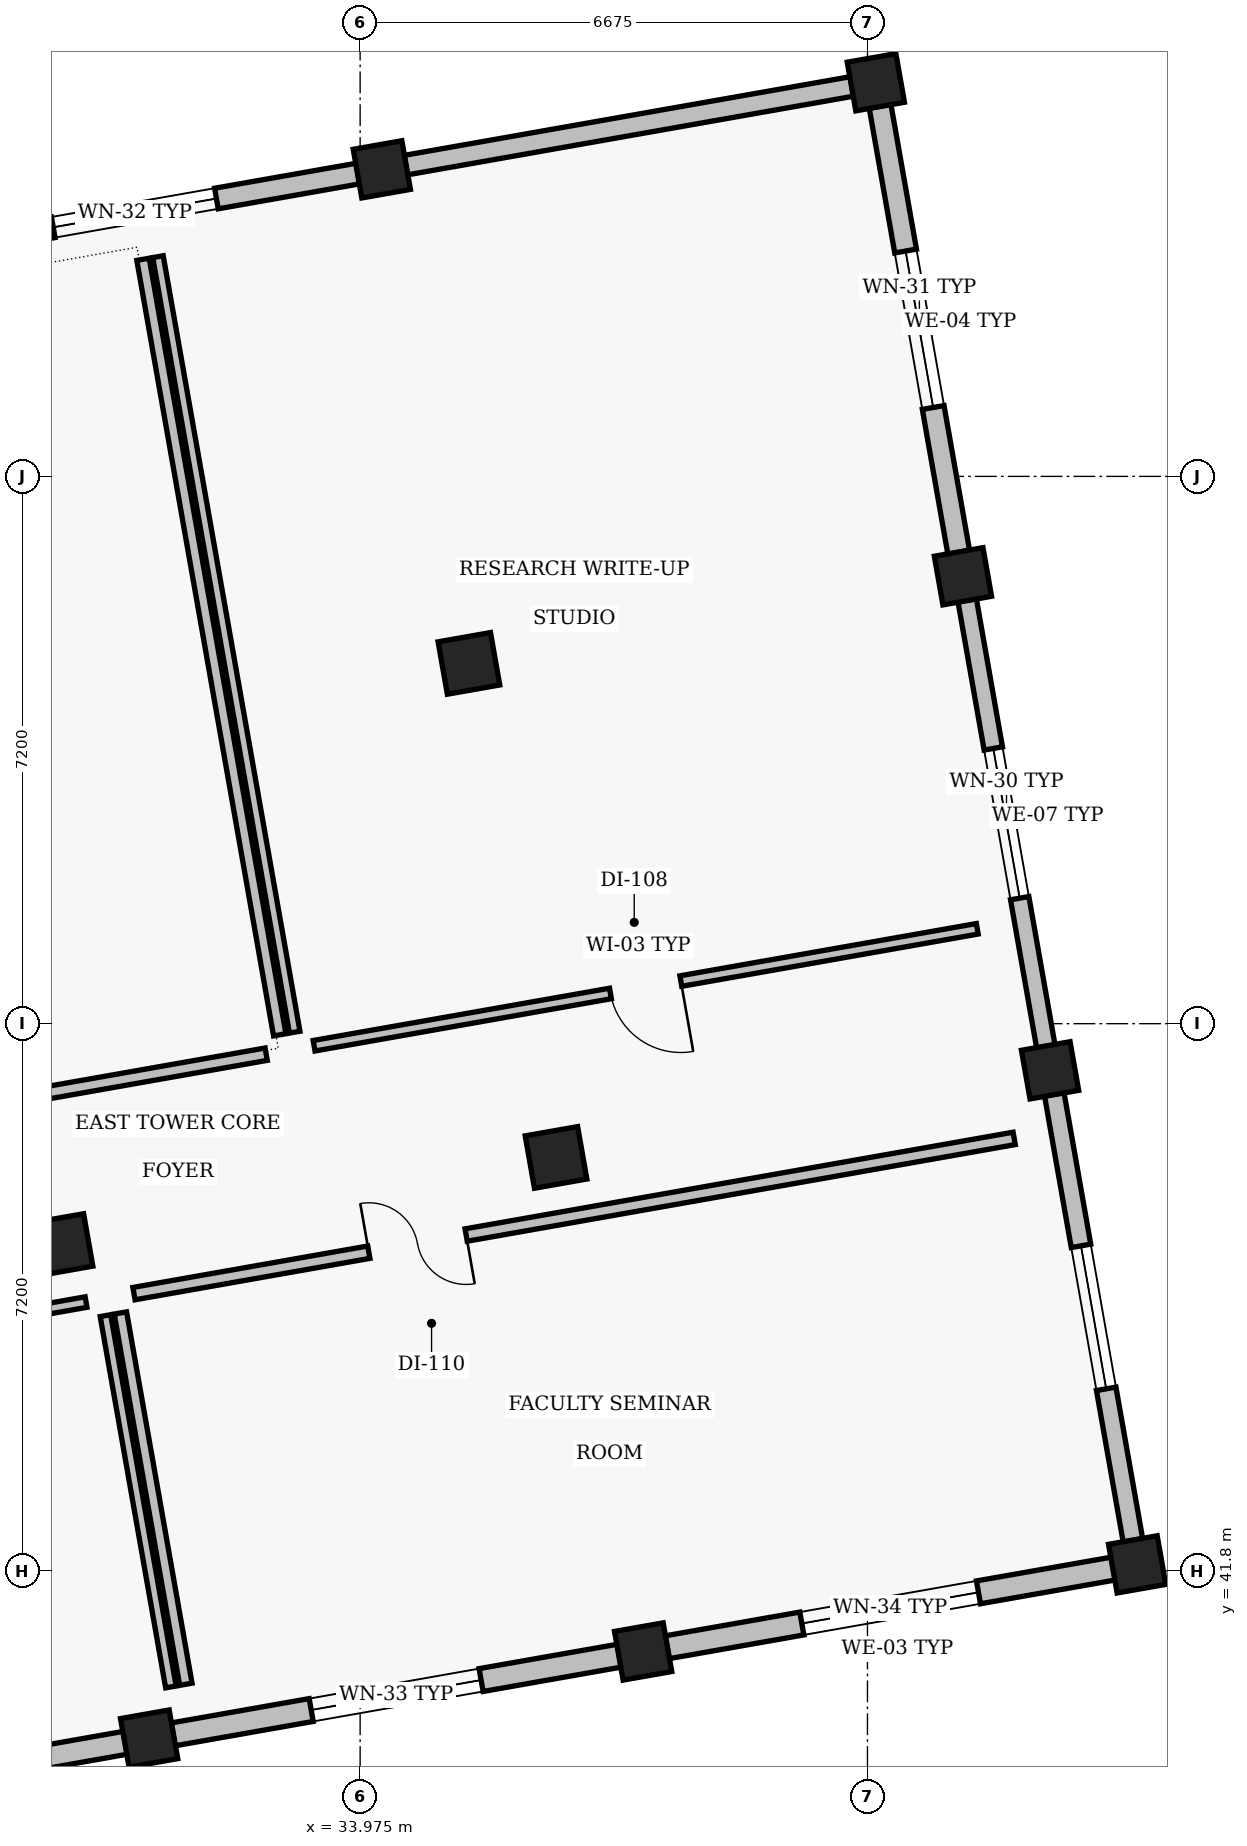
"""IFC4 building model, lengths in metres.
Left out: names, types, materials, properties, quantities, classifications, styles, units other than length and angle.
Written with IfcOpenShell. Run it as: python <this file> out.ifc"""

import sys

from ifc_helpers import new_model, si_unit, direction, frame, frame_2d, origin, origin_2d, place, context, subcontext, project, spatial, rectangle, extrude, element, fill, save


model = new_model("IFC4")
c1 = context("Model", 3, precision=1e-05, world=origin(), true_north=direction((0.0, 1.0)))
c2 = subcontext(c1, "Body", "Model", "MODEL_VIEW")
j1 = project(units=[si_unit("LENGTHUNIT", "METRE"), si_unit("PLANEANGLEUNIT", "RADIAN")], contexts=[c1])
p1 = place(None, origin())
s1 = spatial("IfcSite", under=j1, at=p1, CompositionType="ELEMENT")
p2 = place(p1, origin())
s2 = spatial("IfcBuilding", under=s1, at=p2, CompositionType="ELEMENT")
p3 = place(p2, frame((0.0, 0.0, 18.6)))
s3 = spatial("IfcBuildingStorey", under=s2, at=p3, CompositionType="ELEMENT", Elevation=18.6)
p4 = place(p3, frame((31.199, 39.594, 0.0), z_axis=(0.0, 0.0, 1.0), x_axis=(0.984807753012, 0.173648177667, 0.0)))
e1 = element("IfcColumn", 1, at=p4, inside=s3, PredefinedType="COLUMN", context=c2, shape_type="SweptSolid", body=[
    extrude(rectangle(XDim=0.65, YDim=0.65, at=origin_2d()), origin(), (0.0, 0.0, 1.0), 4.32),
])
p5 = place(p3, frame((30.053, 46.094, 0.0), z_axis=(0.0, 0.0, 1.0), x_axis=(0.984807753012, 0.173648177667, 0.0)))
e2 = element("IfcColumn", 2, at=p5, inside=s3, PredefinedType="COLUMN", context=c2, shape_type="SweptSolid", body=[
    extrude(rectangle(XDim=0.7, YDim=0.7, at=origin_2d()), origin(), (0.0, 0.0, 1.0), 4.32),
])
p6 = place(p3, frame((37.699, 40.74, 0.0), z_axis=(0.0, 0.0, 1.0), x_axis=(0.984807753012, 0.173648177667, 0.0)))
e3 = element("IfcColumn", 3, at=p6, inside=s3, PredefinedType="COLUMN", context=c2, shape_type="SweptSolid", body=[
    extrude(rectangle(XDim=0.65, YDim=0.65, at=origin_2d()), origin(), (0.0, 0.0, 1.0), 4.32),
])
for number, where, z_axis, x_axis in (
    (4, (36.552, 47.24, 0.0), (0.0, 0.0, 1.0), (0.985, 0.174, 0.0)),
    (5, (35.406, 53.74, 0.0), (0.0, 0.0, 1.0), (0.985, 0.174, 0.0)),
):
    element("IfcColumn", number, at=place(p3, frame(where, z_axis=z_axis, x_axis=x_axis)), inside=s3, PredefinedType="COLUMN", context=c2, shape_type="SweptSolid", body=[
        extrude(rectangle(XDim=0.7, YDim=0.7, at=origin_2d()), origin(), (0.0, 0.0, 1.0), 4.32),
    ])
for number, where, z_axis, x_axis in (
    (6, (34.26, 60.24, 0.0), (0.0, 0.0, 1.0), (0.985, 0.174, 0.0)),
    (7, (44.198, 41.886, 0.0), (0.0, 0.0, 1.0), (0.985, 0.174, 0.0)),
    (8, (43.052, 48.386, 0.0), (0.0, 0.0, 1.0), (0.985, 0.174, 0.0)),
    (9, (41.906, 54.886, 0.0), (0.0, 0.0, 1.0), (0.985, 0.174, 0.0)),
    (10, (40.76, 61.386, 0.0), (0.0, 0.0, 1.0), (0.985, 0.174, 0.0)),
):
    element("IfcColumn", number, at=place(p3, frame(where, z_axis=z_axis, x_axis=x_axis)), inside=s3, PredefinedType="COLUMN", context=c2, shape_type="SweptSolid", body=[
        extrude(rectangle(XDim=0.65, YDim=0.65, at=origin_2d()), origin(), (0.0, 0.0, 1.0), 4.32),
    ])
p7 = place(p3, frame((28.076, 59.149, 0.0), z_axis=(0.0, 0.0, 1.0), x_axis=(0.98480829201, 0.173645120828, 0.0)))
e11 = element("IfcWall", 11, at=p7, inside=s3, PredefinedType="STANDARD", context=c2, shape_type="SweptSolid", body=[
    extrude(rectangle(XDim=5.96, YDim=0.275, at=frame_2d((2.98, 0.0))), origin(), (0.0, 0.0, 1.0), 3.855),
])
p8 = place(p7, frame((1.89, 0.0, 0.95)))
e12 = element("IfcOpeningElement", 12, at=p8, cuts=e11, PredefinedType="OPENING", context=c2, shape_type="SweptSolid", body=[
    extrude(rectangle(XDim=2.18, YDim=1.46, at=frame_2d((1.09, 0.73))), frame((0.0, 0.137, 0.0), z_axis=(0.0, -1.0, 0.0), x_axis=(1.0, 0.0, 0.0)), (0.0, 0.0, 1.0), 0.275),
])
p9 = place(p3, frame((34.575, 60.295, 0.0), z_axis=(0.0, 0.0, 1.0), x_axis=(0.984809527099, 0.173638116021, 0.0)))
e13 = element("IfcWall", 13, at=p9, inside=s3, PredefinedType="STANDARD", context=c2, shape_type="SweptSolid", body=[
    extrude(rectangle(XDim=5.96, YDim=0.26, at=frame_2d((2.98, 0.0))), origin(), (0.0, 0.0, 1.0), 3.855),
])
p10 = place(p3, frame((40.816, 61.071, 0.0), z_axis=(0.0, 0.0, 1.0), x_axis=(0.173645120828, -0.98480829201, 0.0)))
e14 = element("IfcWall", 14, at=p10, inside=s3, PredefinedType="STANDARD", context=c2, shape_type="SweptSolid", body=[
    extrude(rectangle(XDim=5.96, YDim=0.29, at=frame_2d((2.98, 0.0))), origin(), (0.0, 0.0, 1.0), 3.855),
])
p11 = place(p10, frame((1.935, 0.0, 0.95)))
e15 = element("IfcOpeningElement", 15, at=p11, cuts=e14, PredefinedType="OPENING", context=c2, shape_type="SweptSolid", body=[
    extrude(rectangle(XDim=2.09, YDim=1.44, at=frame_2d((1.045, 0.72))), frame((0.0, 0.145, 0.0), z_axis=(0.0, -1.0, 0.0), x_axis=(1.0, 0.0, 0.0)), (0.0, 0.0, 1.0), 0.29),
])
p12 = place(p3, frame((41.962, 54.571, 0.0), z_axis=(0.0, 0.0, 1.0), x_axis=(0.173645120828, -0.98480829201, 0.0)))
e16 = element("IfcWall", 16, at=p12, inside=s3, PredefinedType="STANDARD", context=c2, shape_type="SweptSolid", body=[
    extrude(rectangle(XDim=5.96, YDim=0.245, at=frame_2d((2.98, 0.0))), origin(), (0.0, 0.0, 1.0), 3.855),
])
p13 = place(p12, frame((1.98, 0.0, 0.95)))
e17 = element("IfcOpeningElement", 17, at=p13, cuts=e16, PredefinedType="OPENING", context=c2, shape_type="SweptSolid", body=[
    extrude(rectangle(XDim=2.0, YDim=1.42, at=frame_2d((1.0, 0.71))), frame((0.0, 0.123, 0.0), z_axis=(0.0, -1.0, 0.0), x_axis=(1.0, 0.0, 0.0)), (0.0, 0.0, 1.0), 0.245),
])
p14 = place(p3, frame((43.108, 48.071, 0.0), z_axis=(0.0, 0.0, 1.0), x_axis=(0.173645120828, -0.98480829201, 0.0)))
e18 = element("IfcWall", 18, at=p14, inside=s3, PredefinedType="STANDARD", context=c2, shape_type="SweptSolid", body=[
    extrude(rectangle(XDim=5.96, YDim=0.26, at=frame_2d((2.98, 0.0))), origin(), (0.0, 0.0, 1.0), 3.855),
])
p15 = place(p14, frame((2.025, 0.0, 0.95)))
e19 = element("IfcOpeningElement", 19, at=p15, cuts=e18, PredefinedType="OPENING", context=c2, shape_type="SweptSolid", body=[
    extrude(rectangle(XDim=1.91, YDim=1.4, at=frame_2d((0.955, 0.7))), frame((0.0, 0.13, 0.0), z_axis=(0.0, -1.0, 0.0), x_axis=(1.0, 0.0, 0.0)), (0.0, 0.0, 1.0), 0.26),
])
p16 = place(p3, frame((43.883, 41.831, 0.0), z_axis=(0.0, 0.0, 1.0), x_axis=(-0.98480829201, -0.173645120828, 0.0)))
e20 = element("IfcWall", 20, at=p16, inside=s3, PredefinedType="STANDARD", context=c2, shape_type="SweptSolid", body=[
    extrude(rectangle(XDim=5.96, YDim=0.305, at=frame_2d((2.98, 0.0))), origin(), (0.0, 0.0, 1.0), 3.855),
])
p17 = place(p16, frame((1.8, 0.0, 0.95)))
e21 = element("IfcOpeningElement", 21, at=p17, cuts=e20, PredefinedType="OPENING", context=c2, shape_type="SweptSolid", body=[
    extrude(rectangle(XDim=2.36, YDim=1.36, at=frame_2d((1.18, 0.68))), frame((0.0, 0.152, 0.0), z_axis=(0.0, -1.0, 0.0), x_axis=(1.0, 0.0, 0.0)), (0.0, 0.0, 1.0), 0.305),
])
p18 = place(p3, frame((37.384, 40.685, 0.0), z_axis=(0.0, 0.0, 1.0), x_axis=(-0.98480829201, -0.173645120828, 0.0)))
e22 = element("IfcWall", 22, at=p18, inside=s3, PredefinedType="STANDARD", context=c2, shape_type="SweptSolid", body=[
    extrude(rectangle(XDim=5.96, YDim=0.305, at=frame_2d((2.98, 0.0))), origin(), (0.0, 0.0, 1.0), 3.855),
])
p19 = place(p18, frame((1.845, 0.0, 0.95)))
e23 = element("IfcOpeningElement", 23, at=p19, cuts=e22, PredefinedType="OPENING", context=c2, shape_type="SweptSolid", body=[
    extrude(rectangle(XDim=2.27, YDim=1.48, at=frame_2d((1.135, 0.74))), frame((0.0, 0.152, 0.0), z_axis=(0.0, -1.0, 0.0), x_axis=(1.0, 0.0, 0.0)), (0.0, 0.0, 1.0), 0.305),
])
p20 = place(p3, frame((30.884, 39.539, 0.0), z_axis=(0.0, 0.0, 1.0), x_axis=(-0.98480829201, -0.173645120828, 0.0)))
e24 = element("IfcWall", 24, at=p20, inside=s3, PredefinedType="STANDARD", context=c2, shape_type="SweptSolid", body=[
    extrude(rectangle(XDim=5.96, YDim=0.305, at=frame_2d((2.98, 0.0))), origin(), (0.0, 0.0, 1.0), 3.855),
])
p21 = place(p20, frame((1.89, 0.0, 0.95)))
e25 = element("IfcOpeningElement", 25, at=p21, cuts=e24, PredefinedType="OPENING", context=c2, shape_type="SweptSolid", body=[
    extrude(rectangle(XDim=2.18, YDim=1.46, at=frame_2d((1.09, 0.73))), frame((0.0, 0.152, 0.0), z_axis=(0.0, -1.0, 0.0), x_axis=(1.0, 0.0, 0.0)), (0.0, 0.0, 1.0), 0.305),
])
p22 = place(p3, frame((20.665, 46.469, 0.0), z_axis=(0.0, 0.0, 1.0), x_axis=(0.984808006729, 0.173646738761, 0.0)))
e26 = element("IfcWall", 26, at=p22, inside=s3, PredefinedType="PARTITIONING", context=c2, shape_type="SweptSolid", body=[
    extrude(rectangle(XDim=12.26, YDim=0.165, at=frame_2d((6.13, 0.0))), origin(), (0.0, 0.0, 1.0), 3.95),
])
p23 = place(p22, frame((5.525, 0.0, 0.0)))
e27 = element("IfcOpeningElement", 27, at=p23, cuts=e26, PredefinedType="OPENING", context=c2, shape_type="SweptSolid", body=[
    extrude(rectangle(XDim=1.21, YDim=2.16, at=frame_2d((0.605, 1.08))), frame((0.0, 0.083, 0.0), z_axis=(0.0, -1.0, 0.0), x_axis=(1.0, 0.0, 0.0)), (0.0, 0.0, 1.0), 0.165),
])
p24 = place(p3, frame((32.917, 48.853, 0.0), z_axis=(0.0, 0.0, 1.0), x_axis=(-0.173654930775, 0.984806562233, 0.0)))
e28 = element("IfcWall", 28, at=p24, inside=s3, PredefinedType="PARTITIONING", context=c2, shape_type="SweptSolid", body=[
    extrude(rectangle(XDim=10.36, YDim=0.165, at=frame_2d((5.18, 0.0))), origin(), (0.0, 0.0, 1.0), 3.95),
])
p25 = place(p3, frame((33.369, 48.71, 0.0), z_axis=(0.0, 0.0, 1.0), x_axis=(0.984811286856, 0.173628135048, 0.0)))
e29 = element("IfcWall", 29, at=p25, inside=s3, PredefinedType="PARTITIONING", context=c2, shape_type="SweptSolid", body=[
    extrude(rectangle(XDim=8.86, YDim=0.14, at=frame_2d((4.43, 0.0))), origin(), (0.0, 0.0, 1.0), 3.95),
])
p26 = place(p25, frame((3.96, 0.0, 0.0)))
e30 = element("IfcOpeningElement", 30, at=p26, cuts=e29, PredefinedType="OPENING", context=c2, shape_type="SweptSolid", body=[
    extrude(rectangle(XDim=0.94, YDim=2.12, at=frame_2d((0.47, 1.06))), frame((0.0, 0.07, 0.0), z_axis=(0.0, -1.0, 0.0), x_axis=(1.0, 0.0, 0.0)), (0.0, 0.0, 1.0), 0.14),
])
p27 = place(p3, frame((31.315, 59.091, 0.0), z_axis=(0.0, 0.0, 1.0), x_axis=(0.173658960975, -0.984805851563, 0.0)))
e31 = element("IfcWall", 31, at=p27, inside=s3, PredefinedType="PARTITIONING", context=c2, shape_type="SweptSolid", body=[
    extrude(rectangle(XDim=10.36, YDim=0.14, at=frame_2d((5.18, 0.0))), origin(), (0.0, 0.0, 1.0), 3.95),
])
p28 = place(p3, frame((31.485, 40.274, 0.0), z_axis=(0.0, 0.0, 1.0), x_axis=(-0.173658971256, 0.98480584975, 0.0)))
e32 = element("IfcWall", 32, at=p28, inside=s3, PredefinedType="PARTITIONING", context=c2, shape_type="SweptSolid", body=[
    extrude(rectangle(XDim=4.96, YDim=0.14, at=frame_2d((2.48, 0.0))), origin(), (0.0, 0.0, 1.0), 3.95),
])
p29 = place(p3, frame((30.369, 45.337, 0.0), z_axis=(0.0, 0.0, 1.0), x_axis=(-0.984810117332, -0.173634768407, 0.0)))
e33 = element("IfcWall", 33, at=p29, inside=s3, PredefinedType="PARTITIONING", context=c2, shape_type="SweptSolid", body=[
    extrude(rectangle(XDim=4.81, YDim=0.14, at=frame_2d((2.405, 0.0))), origin(), (0.0, 0.0, 1.0), 3.95),
])
p30 = place(p29, frame((1.935, 0.0, 0.0)))
e34 = element("IfcOpeningElement", 34, at=p30, cuts=e33, PredefinedType="OPENING", context=c2, shape_type="SweptSolid", body=[
    extrude(rectangle(XDim=0.94, YDim=2.12, at=frame_2d((0.47, 1.06))), frame((0.0, 0.07, 0.0), z_axis=(0.0, -1.0, 0.0), x_axis=(1.0, 0.0, 0.0)), (0.0, 0.0, 1.0), 0.14),
])
p31 = place(p3, frame((42.581, 47.491, 0.0), z_axis=(0.0, 0.0, 1.0), x_axis=(-0.984805704411, -0.173659795463, 0.0)))
e35 = element("IfcWall", 35, at=p31, inside=s3, PredefinedType="PARTITIONING", context=c2, shape_type="SweptSolid", body=[
    extrude(rectangle(XDim=11.76, YDim=0.165, at=frame_2d((5.88, 0.0))), origin(), (0.0, 0.0, 1.0), 3.95),
])
p32 = place(p31, frame((7.322, 0.0, 0.0)))
e36 = element("IfcOpeningElement", 36, at=p32, cuts=e35, PredefinedType="OPENING", context=c2, shape_type="SweptSolid", body=[
    extrude(rectangle(XDim=1.3, YDim=2.18, at=frame_2d((0.65, 1.09))), frame((0.0, 0.083, 0.0), z_axis=(0.0, -1.0, 0.0), x_axis=(1.0, 0.0, 0.0)), (0.0, 0.0, 1.0), 0.165),
])
p33 = place(p3, frame((30.821, 45.194, 0.0), z_axis=(0.0, 0.0, 1.0), x_axis=(0.173650553511, -0.984807334084, 0.0)))
e37 = element("IfcWall", 37, at=p33, inside=s3, PredefinedType="PARTITIONING", context=c2, shape_type="SweptSolid", body=[
    extrude(rectangle(XDim=4.96, YDim=0.165, at=frame_2d((2.48, 0.0))), origin(), (0.0, 0.0, 1.0), 3.95),
])
p34 = place(p8, origin())
e38 = element("IfcWindow", 38, at=p34, inside=s3, PartitioningType="SINGLE_PANEL", PredefinedType="WINDOW", context=c2, shape_type="SweptSolid", body=[
    extrude(rectangle(XDim=2.18, YDim=1.46, at=frame_2d((1.09, 0.73))), frame((0.0, 0.03, 0.0), z_axis=(0.0, -1.0, 0.0), x_axis=(1.0, 0.0, 0.0)), (0.0, 0.0, 1.0), 0.06),
])
fill(e12, e38)
p35 = place(p11, origin())
e39 = element("IfcWindow", 39, at=p35, inside=s3, PartitioningType="SINGLE_PANEL", PredefinedType="WINDOW", context=c2, shape_type="SweptSolid", body=[
    extrude(rectangle(XDim=2.09, YDim=1.44, at=frame_2d((1.045, 0.72))), frame((0.0, 0.03, 0.0), z_axis=(0.0, -1.0, 0.0), x_axis=(1.0, 0.0, 0.0)), (0.0, 0.0, 1.0), 0.06),
])
fill(e15, e39)
p36 = place(p13, origin())
e40 = element("IfcWindow", 40, at=p36, inside=s3, PartitioningType="SINGLE_PANEL", PredefinedType="WINDOW", context=c2, shape_type="SweptSolid", body=[
    extrude(rectangle(XDim=2.0, YDim=1.42, at=frame_2d((1.0, 0.71))), frame((0.0, 0.03, 0.0), z_axis=(0.0, -1.0, 0.0), x_axis=(1.0, 0.0, 0.0)), (0.0, 0.0, 1.0), 0.06),
])
fill(e17, e40)
p37 = place(p15, origin())
e41 = element("IfcWindow", 41, at=p37, inside=s3, PartitioningType="SINGLE_PANEL", PredefinedType="WINDOW", context=c2, shape_type="SweptSolid", body=[
    extrude(rectangle(XDim=1.91, YDim=1.4, at=frame_2d((0.955, 0.7))), frame((0.0, 0.03, 0.0), z_axis=(0.0, -1.0, 0.0), x_axis=(1.0, 0.0, 0.0)), (0.0, 0.0, 1.0), 0.06),
])
fill(e19, e41)
p38 = place(p17, origin())
e42 = element("IfcWindow", 42, at=p38, inside=s3, PartitioningType="SINGLE_PANEL", PredefinedType="WINDOW", context=c2, shape_type="SweptSolid", body=[
    extrude(rectangle(XDim=2.36, YDim=1.36, at=frame_2d((1.18, 0.68))), frame((0.0, 0.03, 0.0), z_axis=(0.0, -1.0, 0.0), x_axis=(1.0, 0.0, 0.0)), (0.0, 0.0, 1.0), 0.06),
])
fill(e21, e42)
p39 = place(p19, origin())
e43 = element("IfcWindow", 43, at=p39, inside=s3, PartitioningType="SINGLE_PANEL", PredefinedType="WINDOW", context=c2, shape_type="SweptSolid", body=[
    extrude(rectangle(XDim=2.27, YDim=1.48, at=frame_2d((1.135, 0.74))), frame((0.0, 0.03, 0.0), z_axis=(0.0, -1.0, 0.0), x_axis=(1.0, 0.0, 0.0)), (0.0, 0.0, 1.0), 0.06),
])
fill(e23, e43)
p40 = place(p26, origin())
e44 = element("IfcDoor", 44, at=p40, inside=s3, OperationType="SINGLE_SWING_RIGHT", PredefinedType="DOOR", context=c2, shape_type="SweptSolid", body=[
    extrude(rectangle(XDim=0.94, YDim=2.12, at=frame_2d((0.47, 1.06))), frame((0.0, 0.025, 0.0), z_axis=(0.0, -1.0, 0.0), x_axis=(1.0, 0.0, 0.0)), (0.0, 0.0, 1.0), 0.05),
])
fill(e30, e44)
p41 = place(p32, origin())
e45 = element("IfcDoor", 45, at=p41, inside=s3, OperationType="DOUBLE_DOOR_SINGLE_SWING", PredefinedType="DOOR", context=c2, shape_type="SweptSolid", body=[
    extrude(rectangle(XDim=1.3, YDim=2.18, at=frame_2d((0.65, 1.09))), frame((0.0, 0.025, 0.0), z_axis=(0.0, -1.0, 0.0), x_axis=(1.0, 0.0, 0.0)), (0.0, 0.0, 1.0), 0.05),
])
fill(e36, e45)
save(model, sys.argv[1])
